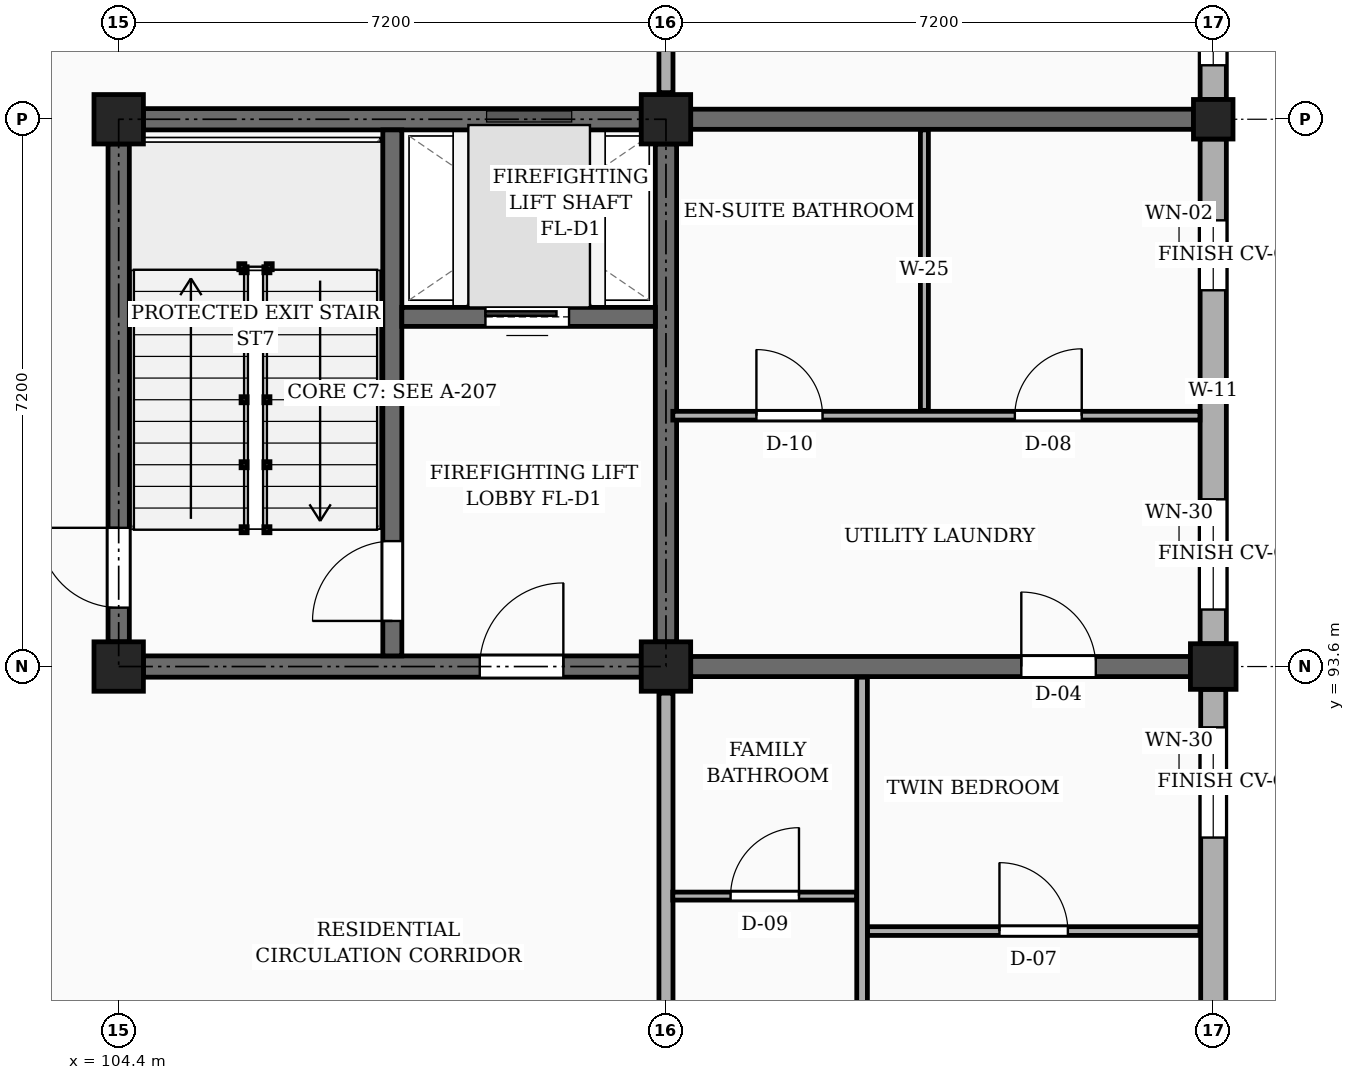
"""IFC4 building model, lengths in metres.
Left out: names, types, materials, properties, quantities, classifications, styles, units other than length and angle.
Written with IfcOpenShell. Run it as: python <this file> out.ifc"""

import sys

from ifc_helpers import new_model, si_unit, direction, frame, frame_2d, origin, origin_2d, place, context, subcontext, project, spatial, rectangle, circle, extrude, element, fill, save


model = new_model("IFC4")
c1 = context("Model", 3, precision=1e-05, world=origin(), true_north=direction((0.0, 1.0)))
c2 = subcontext(c1, "Body", "Model", "MODEL_VIEW")
j1 = project(units=[si_unit("LENGTHUNIT", "METRE"), si_unit("PLANEANGLEUNIT", "RADIAN")], contexts=[c1])
p1 = place(None, origin())
s1 = spatial("IfcSite", under=j1, at=p1, CompositionType="ELEMENT")
p2 = place(p1, origin())
s2 = spatial("IfcBuilding", under=s1, at=p2, CompositionType="ELEMENT")
p3 = place(p2, origin())
s3 = spatial("IfcBuildingStorey", under=s2, at=p3, CompositionType="ELEMENT", Elevation=0.0)
for number, where, z_axis, x_axis in (
    (1, (104.4, 93.6, 0.0), (0.0, 0.0, 1.0), (1.0, 0.0, 0.0)),
    (2, (104.4, 100.8, 0.0), (0.0, 0.0, 1.0), (1.0, 0.0, 0.0)),
    (3, (111.6, 93.6, 0.0), (0.0, 0.0, 1.0), (1.0, 0.0, 0.0)),
    (4, (111.6, 100.8, 0.0), (0.0, 0.0, 1.0), (1.0, 0.0, 0.0)),
):
    element("IfcColumn", number, at=place(p3, frame(where, z_axis=z_axis, x_axis=x_axis)), inside=s3, PredefinedType="COLUMN", context=c2, shape_type="SweptSolid", body=[
        extrude(rectangle(XDim=0.65, YDim=0.65, at=origin_2d()), origin(), (0.0, 0.0, 1.0), 4.5),
    ])
p4 = place(p3, frame((118.8, 93.6, 0.0), z_axis=(0.0, 0.0, 1.0), x_axis=(1.0, 0.0, 0.0)))
e5 = element("IfcColumn", 5, at=p4, inside=s3, PredefinedType="COLUMN", context=c2, shape_type="SweptSolid", body=[
    extrude(rectangle(XDim=0.6, YDim=0.6, at=origin_2d()), origin(), (0.0, 0.0, 1.0), 4.5),
])
p5 = place(p3, frame((118.8, 100.8, 0.0), z_axis=(0.0, 0.0, 1.0), x_axis=(1.0, 0.0, 0.0)))
e6 = element("IfcColumn", 6, at=p5, inside=s3, PredefinedType="COLUMN", context=c2, shape_type="SweptSolid", body=[
    extrude(circle(Radius=0.26, at=origin_2d()), origin(), (0.0, 0.0, 1.0), 4.5),
])
p6 = place(p3, frame((111.925, 93.6, 0.0), z_axis=(0.0, 0.0, 1.0), x_axis=(1.0, 0.0, 0.0)))
e7 = element("IfcWall", 7, at=p6, inside=s3, PredefinedType="SOLIDWALL", context=c2, shape_type="SweptSolid", body=[
    extrude(rectangle(XDim=6.575, YDim=0.265, at=frame_2d((3.288, 0.0))), origin(), (0.0, 0.0, 1.0), 3.54),
])
p7 = place(p6, frame((4.35, 0.0, 0.0)))
e8 = element("IfcOpeningElement", 8, at=p7, cuts=e7, PredefinedType="OPENING", context=c2, shape_type="SweptSolid", body=[
    extrude(rectangle(XDim=0.98, YDim=2.12, at=frame_2d((0.49, 1.06))), frame((0.0, 0.143, 0.0), z_axis=(0.0, -1.0, 0.0), x_axis=(1.0, 0.0, 0.0)), (0.0, 0.0, 1.0), 0.285),
])
p8 = place(p3, frame((111.925, 100.8, 0.0), z_axis=(0.0, 0.0, 1.0), x_axis=(1.0, 0.0, 0.0)))
e9 = element("IfcWall", 9, at=p8, inside=s3, PredefinedType="SOLIDWALL", context=c2, shape_type="SweptSolid", body=[
    extrude(rectangle(XDim=6.615, YDim=0.265, at=frame_2d((3.308, 0.0))), origin(), (0.0, 0.0, 1.0), 3.54),
])
p9 = place(p3, frame((118.8, 86.7, 0.0), z_axis=(0.0, 0.0, 1.0), x_axis=(0.0, 1.0, 0.0)))
e10 = element("IfcWall", 10, at=p9, inside=s3, PredefinedType="SOLIDWALL", context=c2, shape_type="SweptSolid", body=[
    extrude(rectangle(XDim=6.6, YDim=0.33, at=frame_2d((3.3, 0.0))), origin(), (0.0, 0.0, 1.0), 3.81),
])
p10 = place(p9, frame((0.45, 0.0, 0.78)))
e11 = element("IfcOpeningElement", 11, at=p10, cuts=e10, PredefinedType="OPENING", context=c2, shape_type="SweptSolid", body=[
    extrude(rectangle(XDim=1.25, YDim=1.44, at=frame_2d((0.625, 0.72))), frame((0.0, 0.175, 0.0), z_axis=(0.0, -1.0, 0.0), x_axis=(1.0, 0.0, 0.0)), (0.0, 0.0, 1.0), 0.35),
])
p11 = place(p9, frame((4.65, 0.0, 0.78)))
e12 = element("IfcOpeningElement", 12, at=p11, cuts=e10, PredefinedType="OPENING", context=c2, shape_type="SweptSolid", body=[
    extrude(rectangle(XDim=1.45, YDim=1.44, at=frame_2d((0.725, 0.72))), frame((0.0, 0.175, 0.0), z_axis=(0.0, -1.0, 0.0), x_axis=(1.0, 0.0, 0.0)), (0.0, 0.0, 1.0), 0.35),
])
p12 = place(p3, frame((118.8, 93.9, 0.0), z_axis=(0.0, 0.0, 1.0), x_axis=(0.0, 1.0, 0.0)))
e13 = element("IfcWall", 13, at=p12, inside=s3, PredefinedType="SOLIDWALL", context=c2, shape_type="SweptSolid", body=[
    extrude(rectangle(XDim=6.64, YDim=0.345, at=frame_2d((3.32, 0.0))), origin(), (0.0, 0.0, 1.0), 3.81),
])
p13 = place(p12, frame((0.45, 0.0, 0.78)))
e14 = element("IfcOpeningElement", 14, at=p13, cuts=e13, PredefinedType="OPENING", context=c2, shape_type="SweptSolid", body=[
    extrude(rectangle(XDim=1.45, YDim=1.44, at=frame_2d((0.725, 0.72))), frame((0.0, 0.183, 0.0), z_axis=(0.0, -1.0, 0.0), x_axis=(1.0, 0.0, 0.0)), (0.0, 0.0, 1.0), 0.365),
])
p14 = place(p12, frame((4.65, 0.0, 0.78)))
e15 = element("IfcOpeningElement", 15, at=p14, cuts=e13, PredefinedType="OPENING", context=c2, shape_type="SweptSolid", body=[
    extrude(rectangle(XDim=0.92, YDim=1.15, at=frame_2d((0.46, 0.575))), frame((0.0, 0.183, 0.0), z_axis=(0.0, -1.0, 0.0), x_axis=(1.0, 0.0, 0.0)), (0.0, 0.0, 1.0), 0.365),
])
p15 = place(p3, frame((118.8, 101.06, 0.0), z_axis=(0.0, 0.0, 1.0), x_axis=(0.0, 1.0, 0.0)))
e16 = element("IfcWall", 16, at=p15, inside=s3, PredefinedType="SOLIDWALL", context=c2, shape_type="SweptSolid", body=[
    extrude(rectangle(XDim=6.64, YDim=0.345, at=frame_2d((3.32, 0.0))), origin(), (0.0, 0.0, 1.0), 3.81),
])
p16 = place(p15, frame((0.45, 0.0, 0.78)))
e17 = element("IfcOpeningElement", 17, at=p16, cuts=e16, PredefinedType="OPENING", context=c2, shape_type="SweptSolid", body=[
    extrude(rectangle(XDim=0.92, YDim=1.15, at=frame_2d((0.46, 0.575))), frame((0.0, 0.183, 0.0), z_axis=(0.0, -1.0, 0.0), x_axis=(1.0, 0.0, 0.0)), (0.0, 0.0, 1.0), 0.365),
])
p17 = place(p15, frame((4.65, 0.0, 0.78)))
e18 = element("IfcOpeningElement", 18, at=p17, cuts=e16, PredefinedType="OPENING", context=c2, shape_type="SweptSolid", body=[
    extrude(rectangle(XDim=1.08, YDim=1.15, at=frame_2d((0.54, 0.575))), frame((0.0, 0.183, 0.0), z_axis=(0.0, -1.0, 0.0), x_axis=(1.0, 0.0, 0.0)), (0.0, 0.0, 1.0), 0.365),
])
p18 = place(p3, frame((104.4, 93.925, 0.0), z_axis=(0.0, 0.0, 1.0), x_axis=(0.0, 1.0, 0.0)))
e19 = element("IfcWall", 19, at=p18, inside=s3, PredefinedType="SHEAR", context=c2, shape_type="SweptSolid", body=[
    extrude(rectangle(XDim=6.55, YDim=0.28, at=frame_2d((3.275, 0.0))), origin(), (0.0, 0.0, 1.0), 4.24),
])
p19 = place(p18, frame((0.45, 0.0, 0.0)))
e20 = element("IfcOpeningElement", 20, at=p19, cuts=e19, PredefinedType="OPENING", context=c2, shape_type="SweptSolid", body=[
    extrude(rectangle(XDim=1.05, YDim=2.15, at=frame_2d((0.525, 1.075))), frame((0.0, 0.15, 0.0), z_axis=(0.0, -1.0, 0.0), x_axis=(1.0, 0.0, 0.0)), (0.0, 0.0, 1.0), 0.3),
])
p20 = place(p3, frame((104.725, 100.8, 0.0), z_axis=(0.0, 0.0, 1.0), x_axis=(1.0, 0.0, 0.0)))
e21 = element("IfcWall", 21, at=p20, inside=s3, PredefinedType="SHEAR", context=c2, shape_type="SweptSolid", body=[
    extrude(rectangle(XDim=6.55, YDim=0.28, at=frame_2d((3.275, 0.0))), origin(), (0.0, 0.0, 1.0), 4.24),
])
p21 = place(p3, frame((111.6, 93.925, 0.0), z_axis=(0.0, 0.0, 1.0), x_axis=(0.0, 1.0, 0.0)))
e22 = element("IfcWall", 22, at=p21, inside=s3, PredefinedType="SHEAR", context=c2, shape_type="SweptSolid", body=[
    extrude(rectangle(XDim=6.55, YDim=0.28, at=frame_2d((3.275, 0.0))), origin(), (0.0, 0.0, 1.0), 4.24),
])
p22 = place(p3, frame((104.725, 93.6, 0.0), z_axis=(0.0, 0.0, 1.0), x_axis=(1.0, 0.0, 0.0)))
e23 = element("IfcWall", 23, at=p22, inside=s3, PredefinedType="SHEAR", context=c2, shape_type="SweptSolid", body=[
    extrude(rectangle(XDim=6.55, YDim=0.28, at=frame_2d((3.275, 0.0))), origin(), (0.0, 0.0, 1.0), 4.24),
])
p23 = place(p22, frame((4.425, 0.0, 0.0)))
e24 = element("IfcOpeningElement", 24, at=p23, cuts=e23, PredefinedType="OPENING", context=c2, shape_type="SweptSolid", body=[
    extrude(rectangle(XDim=1.1, YDim=2.15, at=frame_2d((0.55, 1.075))), frame((0.0, 0.15, 0.0), z_axis=(0.0, -1.0, 0.0), x_axis=(1.0, 0.0, 0.0)), (0.0, 0.0, 1.0), 0.3),
])
p24 = place(p3, frame((108.0, 93.74, 0.0), z_axis=(0.0, 0.0, 1.0), x_axis=(0.0, 1.0, 0.0)))
e25 = element("IfcWall", 25, at=p24, inside=s3, PredefinedType="SHEAR", context=c2, shape_type="SweptSolid", body=[
    extrude(rectangle(XDim=6.92, YDim=0.25, at=frame_2d((3.46, 0.0))), origin(), (0.0, 0.0, 1.0), 4.24),
])
p25 = place(p24, frame((0.46, 0.0, 0.0)))
e26 = element("IfcOpeningElement", 26, at=p25, cuts=e25, PredefinedType="OPENING", context=c2, shape_type="SweptSolid", body=[
    extrude(rectangle(XDim=1.05, YDim=2.15, at=frame_2d((0.525, 1.075))), frame((0.0, 0.135, 0.0), z_axis=(0.0, -1.0, 0.0), x_axis=(1.0, 0.0, 0.0)), (0.0, 0.0, 1.0), 0.27),
])
p26 = place(p3, frame((108.125, 98.2, 0.0), z_axis=(0.0, 0.0, 1.0), x_axis=(1.0, 0.0, 0.0)))
e27 = element("IfcWall", 27, at=p26, inside=s3, PredefinedType="SHEAR", context=c2, shape_type="SweptSolid", body=[
    extrude(rectangle(XDim=3.335, YDim=0.25, at=frame_2d((1.667, 0.0))), origin(), (0.0, 0.0, 1.0), 4.24),
])
p27 = place(p26, frame((1.1, 0.0, 0.0)))
e28 = element("IfcOpeningElement", 28, at=p27, cuts=e27, PredefinedType="OPENING", context=c2, shape_type="SweptSolid", body=[
    extrude(rectangle(XDim=1.1, YDim=2.2, at=frame_2d((0.55, 1.1))), frame((0.0, 0.135, 0.0), z_axis=(0.0, -1.0, 0.0), x_axis=(1.0, 0.0, 0.0)), (0.0, 0.0, 1.0), 0.27),
])
p28 = place(p3, frame((111.6, 86.75, 0.0), z_axis=(0.0, 0.0, 1.0), x_axis=(0.0, 1.0, 0.0)))
e29 = element("IfcWall", 29, at=p28, inside=s3, PredefinedType="PARTITIONING", context=c2, shape_type="SweptSolid", body=[
    extrude(rectangle(XDim=6.5, YDim=0.185, at=frame_2d((3.25, 0.0))), origin(), (0.0, 0.0, 1.0), 3.49),
])
p29 = place(p28, frame((1.0, 0.0, 0.0)))
e30 = element("IfcOpeningElement", 30, at=p29, cuts=e29, PredefinedType="OPENING", context=c2, shape_type="SweptSolid", body=[
    extrude(rectangle(XDim=1.14, YDim=2.18, at=frame_2d((0.57, 1.09))), frame((0.0, 0.103, 0.0), z_axis=(0.0, -1.0, 0.0), x_axis=(1.0, 0.0, 0.0)), (0.0, 0.0, 1.0), 0.205),
])
p30 = place(p3, frame((111.6, 101.15, 0.0), z_axis=(0.0, 0.0, 1.0), x_axis=(0.0, 1.0, 0.0)))
e31 = element("IfcWall", 31, at=p30, inside=s3, PredefinedType="PARTITIONING", context=c2, shape_type="SweptSolid", body=[
    extrude(rectangle(XDim=6.5, YDim=0.185, at=frame_2d((3.25, 0.0))), origin(), (0.0, 0.0, 1.0), 3.49),
])
p31 = place(p30, frame((1.1, 0.0, 0.0)))
e32 = element("IfcOpeningElement", 32, at=p31, cuts=e31, PredefinedType="OPENING", context=c2, shape_type="SweptSolid", body=[
    extrude(rectangle(XDim=1.0, YDim=2.15, at=frame_2d((0.5, 1.075))), frame((0.0, 0.103, 0.0), z_axis=(0.0, -1.0, 0.0), x_axis=(1.0, 0.0, 0.0)), (0.0, 0.0, 1.0), 0.205),
])
p32 = place(p3, frame((114.25, 90.12, 0.0), z_axis=(0.0, 0.0, 1.0), x_axis=(1.0, 0.0, 0.0)))
e33 = element("IfcWall", 33, at=p32, inside=s3, PredefinedType="PARTITIONING", context=c2, shape_type="SweptSolid", body=[
    extrude(rectangle(XDim=4.375, YDim=0.115, at=frame_2d((2.188, 0.0))), origin(), (0.0, 0.0, 1.0), 3.675),
])
p33 = place(p32, frame((1.738, 0.0, 0.0)))
e34 = element("IfcOpeningElement", 34, at=p33, cuts=e33, PredefinedType="OPENING", context=c2, shape_type="SweptSolid", body=[
    extrude(rectangle(XDim=0.9, YDim=2.1, at=frame_2d((0.45, 1.05))), frame((0.0, 0.067, 0.0), z_axis=(0.0, -1.0, 0.0), x_axis=(1.0, 0.0, 0.0)), (0.0, 0.0, 1.0), 0.135),
])
p34 = place(p3, frame((111.69, 90.58, 0.0), z_axis=(0.0, 0.0, 1.0), x_axis=(1.0, 0.0, 0.0)))
e35 = element("IfcWall", 35, at=p34, inside=s3, PredefinedType="PARTITIONING", context=c2, shape_type="SweptSolid", body=[
    extrude(rectangle(XDim=2.42, YDim=0.105, at=frame_2d((1.21, 0.0))), origin(), (0.0, 0.0, 1.0), 3.675),
])
p35 = place(p34, frame((0.76, 0.0, 0.0)))
e36 = element("IfcOpeningElement", 36, at=p35, cuts=e35, PredefinedType="OPENING", context=c2, shape_type="SweptSolid", body=[
    extrude(rectangle(XDim=0.9, YDim=2.05, at=frame_2d((0.45, 1.025))), frame((0.0, 0.062, 0.0), z_axis=(0.0, -1.0, 0.0), x_axis=(1.0, 0.0, 0.0)), (0.0, 0.0, 1.0), 0.125),
])
p36 = place(p3, frame((114.18, 86.575, 0.0), z_axis=(0.0, 0.0, 1.0), x_axis=(0.0, 1.0, 0.0)))
e37 = element("IfcWall", 37, at=p36, inside=s3, PredefinedType="PARTITIONING", context=c2, shape_type="SweptSolid", body=[
    extrude(rectangle(XDim=6.885, YDim=0.14, at=frame_2d((3.442, 0.0))), origin(), (0.0, 0.0, 1.0), 3.675),
])
p37 = place(p36, frame((1.275, 0.0, 0.0)))
e38 = element("IfcOpeningElement", 38, at=p37, cuts=e37, PredefinedType="OPENING", context=c2, shape_type="SweptSolid", body=[
    extrude(rectangle(XDim=0.95, YDim=2.1, at=frame_2d((0.475, 1.05))), frame((0.0, 0.08, 0.0), z_axis=(0.0, -1.0, 0.0), x_axis=(1.0, 0.0, 0.0)), (0.0, 0.0, 1.0), 0.16),
])
p38 = place(p3, frame((111.69, 96.9, 0.0), z_axis=(0.0, 0.0, 1.0), x_axis=(1.0, 0.0, 0.0)))
e39 = element("IfcWall", 39, at=p38, inside=s3, PredefinedType="PARTITIONING", context=c2, shape_type="SweptSolid", body=[
    extrude(rectangle(XDim=6.935, YDim=0.115, at=frame_2d((3.468, 0.0))), origin(), (0.0, 0.0, 1.0), 3.675),
])
p39 = place(p38, frame((1.1, 0.0, 0.0)))
e40 = element("IfcOpeningElement", 40, at=p39, cuts=e39, PredefinedType="OPENING", context=c2, shape_type="SweptSolid", body=[
    extrude(rectangle(XDim=0.87, YDim=2.05, at=frame_2d((0.435, 1.025))), frame((0.0, 0.067, 0.0), z_axis=(0.0, -1.0, 0.0), x_axis=(1.0, 0.0, 0.0)), (0.0, 0.0, 1.0), 0.135),
])
p40 = place(p38, frame((4.5, 0.0, 0.0)))
e41 = element("IfcOpeningElement", 41, at=p40, cuts=e39, PredefinedType="OPENING", context=c2, shape_type="SweptSolid", body=[
    extrude(rectangle(XDim=0.88, YDim=2.08, at=frame_2d((0.44, 1.04))), frame((0.0, 0.067, 0.0), z_axis=(0.0, -1.0, 0.0), x_axis=(1.0, 0.0, 0.0)), (0.0, 0.0, 1.0), 0.135),
])
p41 = place(p3, frame((115.0, 96.97, 0.0), z_axis=(0.0, 0.0, 1.0), x_axis=(0.0, 1.0, 0.0)))
e42 = element("IfcWall", 42, at=p41, inside=s3, PredefinedType="PARTITIONING", context=c2, shape_type="SweptSolid", body=[
    extrude(rectangle(XDim=3.69, YDim=0.105, at=frame_2d((1.845, 0.0))), origin(), (0.0, 0.0, 1.0), 3.675),
])
p42 = place(p11, origin())
e43 = element("IfcWindow", 43, at=p42, inside=s3, PartitioningType="SINGLE_PANEL", PredefinedType="WINDOW", context=c2, shape_type="SweptSolid", body=[
    extrude(rectangle(XDim=1.45, YDim=1.44, at=frame_2d((0.725, 0.72))), frame((0.0, 0.03, 0.0), z_axis=(0.0, -1.0, 0.0), x_axis=(1.0, 0.0, 0.0)), (0.0, 0.0, 1.0), 0.06),
])
fill(e12, e43)
p43 = place(p13, origin())
e44 = element("IfcWindow", 44, at=p43, inside=s3, PartitioningType="SINGLE_PANEL", PredefinedType="WINDOW", context=c2, shape_type="SweptSolid", body=[
    extrude(rectangle(XDim=1.45, YDim=1.44, at=frame_2d((0.725, 0.72))), frame((0.0, 0.03, 0.0), z_axis=(0.0, -1.0, 0.0), x_axis=(1.0, 0.0, 0.0)), (0.0, 0.0, 1.0), 0.06),
])
fill(e14, e44)
p44 = place(p14, origin())
e45 = element("IfcWindow", 45, at=p44, inside=s3, PartitioningType="SINGLE_PANEL", PredefinedType="WINDOW", context=c2, shape_type="SweptSolid", body=[
    extrude(rectangle(XDim=0.92, YDim=1.15, at=frame_2d((0.46, 0.575))), frame((0.0, 0.03, 0.0), z_axis=(0.0, -1.0, 0.0), x_axis=(1.0, 0.0, 0.0)), (0.0, 0.0, 1.0), 0.06),
])
fill(e15, e45)
p45 = place(p16, origin())
e46 = element("IfcWindow", 46, at=p45, inside=s3, PartitioningType="SINGLE_PANEL", PredefinedType="WINDOW", context=c2, shape_type="SweptSolid", body=[
    extrude(rectangle(XDim=0.92, YDim=1.15, at=frame_2d((0.46, 0.575))), frame((0.0, 0.03, 0.0), z_axis=(0.0, -1.0, 0.0), x_axis=(1.0, 0.0, 0.0)), (0.0, 0.0, 1.0), 0.06),
])
fill(e17, e46)
p46 = place(p19, origin())
e47 = element("IfcDoor", 47, at=p46, inside=s3, OperationType="SINGLE_SWING_RIGHT", PredefinedType="DOOR", context=c2, shape_type="SweptSolid", body=[
    extrude(rectangle(XDim=1.05, YDim=2.15, at=frame_2d((0.525, 1.075))), frame((0.0, 0.025, 0.0), z_axis=(0.0, -1.0, 0.0), x_axis=(1.0, 0.0, 0.0)), (0.0, 0.0, 1.0), 0.05),
])
fill(e20, e47)
p47 = place(p23, frame((1.1, 0.0, 0.0), z_axis=(0.0, 0.0, 1.0), x_axis=(-1.0, 0.0, 0.0)))
e48 = element("IfcDoor", 48, at=p47, inside=s3, OperationType="SINGLE_SWING_RIGHT", PredefinedType="DOOR", context=c2, shape_type="SweptSolid", body=[
    extrude(rectangle(XDim=1.1, YDim=2.15, at=frame_2d((0.55, 1.075))), frame((0.0, 0.025, 0.0), z_axis=(0.0, -1.0, 0.0), x_axis=(1.0, 0.0, 0.0)), (0.0, 0.0, 1.0), 0.05),
])
fill(e24, e48)
p48 = place(p25, frame((1.05, 0.0, 0.0), z_axis=(0.0, 0.0, 1.0), x_axis=(-1.0, 0.0, 0.0)))
e49 = element("IfcDoor", 49, at=p48, inside=s3, OperationType="SINGLE_SWING_LEFT", PredefinedType="DOOR", context=c2, shape_type="SweptSolid", body=[
    extrude(rectangle(XDim=1.05, YDim=2.15, at=frame_2d((0.525, 1.075))), frame((0.0, 0.025, 0.0), z_axis=(0.0, -1.0, 0.0), x_axis=(1.0, 0.0, 0.0)), (0.0, 0.0, 1.0), 0.05),
])
fill(e26, e49)
p49 = place(p27, origin())
e50 = element("IfcDoor", 50, at=p49, inside=s3, OperationType="SLIDING_TO_LEFT", PredefinedType="DOOR", context=c2, shape_type="SweptSolid", body=[
    extrude(rectangle(XDim=1.1, YDim=2.2, at=frame_2d((0.55, 1.1))), frame((0.0, 0.025, 0.0), z_axis=(0.0, -1.0, 0.0), x_axis=(1.0, 0.0, 0.0)), (0.0, 0.0, 1.0), 0.05),
])
fill(e28, e50)
p50 = place(p33, origin())
e51 = element("IfcDoor", 51, at=p50, inside=s3, OperationType="SINGLE_SWING_LEFT", PredefinedType="DOOR", context=c2, shape_type="SweptSolid", body=[
    extrude(rectangle(XDim=0.9, YDim=2.1, at=frame_2d((0.45, 1.05))), frame((0.0, 0.025, 0.0), z_axis=(0.0, -1.0, 0.0), x_axis=(1.0, 0.0, 0.0)), (0.0, 0.0, 1.0), 0.05),
])
fill(e34, e51)
p51 = place(p35, origin())
e52 = element("IfcDoor", 52, at=p51, inside=s3, OperationType="SINGLE_SWING_RIGHT", PredefinedType="DOOR", context=c2, shape_type="SweptSolid", body=[
    extrude(rectangle(XDim=0.9, YDim=2.05, at=frame_2d((0.45, 1.025))), frame((0.0, 0.025, 0.0), z_axis=(0.0, -1.0, 0.0), x_axis=(1.0, 0.0, 0.0)), (0.0, 0.0, 1.0), 0.05),
])
fill(e36, e52)
p52 = place(p39, origin())
e53 = element("IfcDoor", 53, at=p52, inside=s3, OperationType="SINGLE_SWING_LEFT", PredefinedType="DOOR", context=c2, shape_type="SweptSolid", body=[
    extrude(rectangle(XDim=0.87, YDim=2.05, at=frame_2d((0.435, 1.025))), frame((0.0, 0.025, 0.0), z_axis=(0.0, -1.0, 0.0), x_axis=(1.0, 0.0, 0.0)), (0.0, 0.0, 1.0), 0.05),
])
fill(e40, e53)
p53 = place(p40, origin())
e54 = element("IfcDoor", 54, at=p53, inside=s3, OperationType="SINGLE_SWING_RIGHT", PredefinedType="DOOR", context=c2, shape_type="SweptSolid", body=[
    extrude(rectangle(XDim=0.88, YDim=2.08, at=frame_2d((0.44, 1.04))), frame((0.0, 0.025, 0.0), z_axis=(0.0, -1.0, 0.0), x_axis=(1.0, 0.0, 0.0)), (0.0, 0.0, 1.0), 0.05),
])
fill(e41, e54)
p54 = place(p7, origin())
e55 = element("IfcDoor", 55, at=p54, inside=s3, OperationType="SINGLE_SWING_LEFT", PredefinedType="DOOR", context=c2, shape_type="SweptSolid", body=[
    extrude(rectangle(XDim=0.98, YDim=2.12, at=frame_2d((0.49, 1.06))), frame((0.0, 0.025, 0.0), z_axis=(0.0, -1.0, 0.0), x_axis=(1.0, 0.0, 0.0)), (0.0, 0.0, 1.0), 0.05),
])
fill(e8, e55)
save(model, sys.argv[1])
